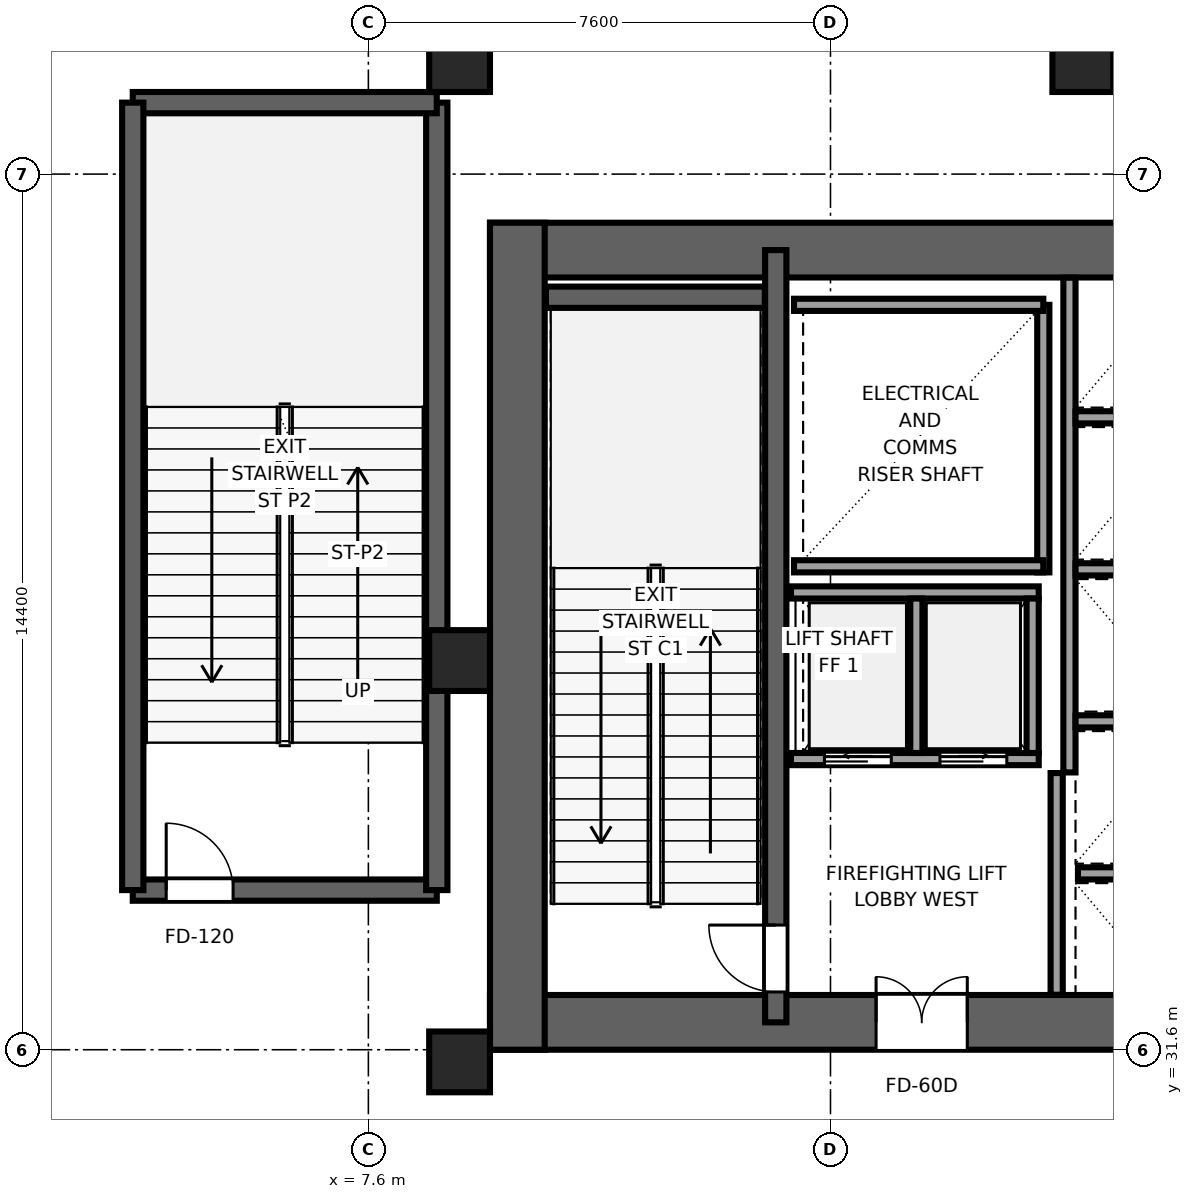
"""IFC4 building model, lengths in metres.
Left out: names, types, materials, properties, quantities, classifications, styles, units other than length and angle.
Written with IfcOpenShell. Run it as: python <this file> out.ifc"""

import sys

from ifc_helpers import new_model, si_unit, direction, frame, frame_2d, origin, origin_2d, place, context, subcontext, project, spatial, rectangle, extrude, source, transform, mapped, element, fill, save


model = new_model("IFC4")
c1 = context("Model", 3, precision=1e-05, world=origin(), true_north=direction((0.0, 1.0)))
c2 = subcontext(c1, "Body", "Model", "MODEL_VIEW")
j1 = project(units=[si_unit("LENGTHUNIT", "METRE"), si_unit("PLANEANGLEUNIT", "RADIAN")], contexts=[c1])
p1 = place(None, origin())
s1 = spatial("IfcSite", under=j1, at=p1, CompositionType="ELEMENT")
p2 = place(p1, origin())
s2 = spatial("IfcBuilding", under=s1, at=p2, CompositionType="ELEMENT")
p3 = place(p2, frame((0.0, 0.0, 16.0)))
s3 = spatial("IfcBuildingStorey", under=s2, at=p3, CompositionType="ELEMENT", Elevation=16.0)
p4 = place(p3, frame((9.6, 32.05, 0.0), z_axis=(0.0, 0.0, 1.0), x_axis=(1.0, 0.0, 0.0)))
e1 = element("IfcWall", 1, at=p4, inside=s3, PredefinedType="SHEAR", context=c2, shape_type="SweptSolid", body=[
    extrude(rectangle(XDim=26.8, YDim=0.9, at=frame_2d((13.4, 0.0))), origin(), (0.0, 0.0, 1.0), 6.4),
])
p5 = place(p4, frame((7.85, 0.0, 0.0), z_axis=(0.0, 0.0, 1.0), x_axis=(-1.0, 0.0, 0.0)))
e2 = element("IfcOpeningElement", 2, at=p5, cuts=e1, PredefinedType="OPENING", context=c2, shape_type="SweptSolid", body=[
    extrude(rectangle(XDim=1.5, YDim=2.04, at=frame_2d((0.75, 1.02))), frame((0.0, 0.46, 0.0), z_axis=(0.0, -1.0, 0.0), x_axis=(1.0, 0.0, 0.0)), (0.0, 0.0, 1.0), 0.92),
])
p6 = place(p4, frame((14.15, 0.0, 0.0), z_axis=(0.0, 0.0, 1.0), x_axis=(-1.0, 0.0, 0.0)))
e3 = element("IfcOpeningElement", 3, at=p6, cuts=e1, PredefinedType="OPENING", context=c2, shape_type="SweptSolid", body=[
    extrude(rectangle(XDim=1.5, YDim=2.04, at=frame_2d((0.75, 1.02))), frame((0.0, 0.46, 0.0), z_axis=(0.0, -1.0, 0.0), x_axis=(1.0, 0.0, 0.0)), (0.0, 0.0, 1.0), 0.92),
])
p7 = place(p4, frame((20.45, 0.0, 0.0), z_axis=(0.0, 0.0, 1.0), x_axis=(-1.0, 0.0, 0.0)))
e4 = element("IfcOpeningElement", 4, at=p7, cuts=e1, PredefinedType="OPENING", context=c2, shape_type="SweptSolid", body=[
    extrude(rectangle(XDim=1.5, YDim=2.04, at=frame_2d((0.75, 1.02))), frame((0.0, 0.46, 0.0), z_axis=(0.0, -1.0, 0.0), x_axis=(1.0, 0.0, 0.0)), (0.0, 0.0, 1.0), 0.92),
])
p8 = place(p3, frame((9.6, 44.75, 0.0), z_axis=(0.0, 0.0, 1.0), x_axis=(1.0, 0.0, 0.0)))
e5 = element("IfcWall", 5, at=p8, inside=s3, PredefinedType="SHEAR", context=c2, shape_type="SweptSolid", body=[
    extrude(rectangle(XDim=26.8, YDim=0.9, at=frame_2d((13.4, 0.0))), origin(), (0.0, 0.0, 1.0), 6.4),
])
p9 = place(p3, frame((10.05, 31.6, 0.0), z_axis=(0.0, 0.0, 1.0), x_axis=(0.0, 1.0, 0.0)))
e6 = element("IfcWall", 6, at=p9, inside=s3, PredefinedType="SHEAR", context=c2, shape_type="SweptSolid", body=[
    extrude(rectangle(XDim=13.6, YDim=0.9, at=frame_2d((6.8, 0.0))), origin(), (0.0, 0.0, 1.0), 6.4),
])
p10 = place(p3, frame((14.3, 32.05, 0.0), z_axis=(0.0, 0.0, 1.0), x_axis=(0.0, 1.0, 0.0)))
e7 = element("IfcWall", 7, at=p10, inside=s3, PredefinedType="SHEAR", context=c2, shape_type="SweptSolid", body=[
    extrude(rectangle(XDim=12.7, YDim=0.35, at=frame_2d((6.35, 0.0))), origin(), (0.0, 0.0, 1.0), 6.4),
])
p11 = place(p10, frame((0.5, 0.0, 0.0)))
e8 = element("IfcOpeningElement", 8, at=p11, cuts=e7, PredefinedType="OPENING", context=c2, shape_type="SweptSolid", body=[
    extrude(rectangle(XDim=1.1, YDim=2.12, at=frame_2d((0.55, 1.06))), frame((0.0, 0.185, 0.0), z_axis=(0.0, -1.0, 0.0), x_axis=(1.0, 0.0, 0.0)), (0.0, 0.0, 1.0), 0.37),
])
p12 = place(p3, frame((10.52, 43.975, 0.0), z_axis=(0.0, 0.0, 1.0), x_axis=(1.0, 0.0, 0.0)))
e9 = element("IfcWall", 9, at=p12, inside=s3, PredefinedType="SHEAR", context=c2, shape_type="SweptSolid", body=[
    extrude(rectangle(XDim=3.6, YDim=0.35, at=frame_2d((1.8, 0.0))), origin(), (0.0, 0.0, 1.0), 6.4),
])
p13 = place(p3, frame((3.725, 34.225, 0.0), z_axis=(0.0, 0.0, 1.0), x_axis=(1.0, 0.0, 0.0)))
e10 = element("IfcWall", 10, at=p13, inside=s3, PredefinedType="SHEAR", context=c2, shape_type="SweptSolid", body=[
    extrude(rectangle(XDim=5.0, YDim=0.35, at=frame_2d((2.5, 0.0))), origin(), (0.0, 0.0, 1.0), 6.4),
])
p14 = place(p13, frame((0.55, 0.0, 0.0)))
e11 = element("IfcOpeningElement", 11, at=p14, cuts=e10, PredefinedType="OPENING", context=c2, shape_type="SweptSolid", body=[
    extrude(rectangle(XDim=1.1, YDim=2.12, at=frame_2d((0.55, 1.06))), frame((0.0, 0.185, 0.0), z_axis=(0.0, -1.0, 0.0), x_axis=(1.0, 0.0, 0.0)), (0.0, 0.0, 1.0), 0.37),
])
p15 = place(p3, frame((8.725, 34.225, 0.0), z_axis=(0.0, 0.0, 1.0), x_axis=(0.0, 1.0, 0.0)))
e12 = element("IfcWall", 12, at=p15, inside=s3, PredefinedType="SHEAR", context=c2, shape_type="SweptSolid", body=[
    extrude(rectangle(XDim=12.95, YDim=0.35, at=frame_2d((6.475, 0.0))), origin(), (0.0, 0.0, 1.0), 6.4),
])
p16 = place(p3, frame((8.725, 47.175, 0.0), z_axis=(0.0, 0.0, 1.0), x_axis=(-1.0, 0.0, 0.0)))
e13 = element("IfcWall", 13, at=p16, inside=s3, PredefinedType="SHEAR", context=c2, shape_type="SweptSolid", body=[
    extrude(rectangle(XDim=5.0, YDim=0.35, at=frame_2d((2.5, 0.0))), origin(), (0.0, 0.0, 1.0), 6.4),
])
p17 = place(p3, frame((3.725, 47.175, 0.0), z_axis=(0.0, 0.0, 1.0), x_axis=(0.0, -1.0, 0.0)))
e14 = element("IfcWall", 14, at=p17, inside=s3, PredefinedType="SHEAR", context=c2, shape_type="SweptSolid", body=[
    extrude(rectangle(XDim=12.95, YDim=0.35, at=frame_2d((6.475, 0.0))), origin(), (0.0, 0.0, 1.0), 6.4),
])
m1 = source(origin(), c2, "Body", "SweptSolid", [
    extrude(rectangle(XDim=1.0, YDim=1.0, at=origin_2d()), origin(), (0.0, 0.0, 1.0), 6.4),
])
for number, where, z_axis, x_axis in (
    (15, (9.1, 47.85, 0.0), (0.0, 0.0, 1.0), (1.0, 0.0, 0.0)),
    (16, (19.35, 47.85, 0.0), (0.0, 0.0, 1.0), (1.0, 0.0, 0.0)),
    (17, (9.1, 38.0, 0.0), (0.0, 0.0, 1.0), (1.0, 0.0, 0.0)),
    (18, (9.1, 31.4, 0.0), (0.0, 0.0, 1.0), (1.0, 0.0, 0.0)),
):
    element("IfcColumn", number, at=place(p3, frame(where, z_axis=z_axis, x_axis=x_axis)), inside=s3, PredefinedType="COLUMN", context=c2, shape_type="MappedRepresentation", body=[
        mapped(m1, transform((0.0, 0.0, 0.0), x_axis=(1.0, 0.0, 0.0), y_axis=(0.0, 1.0, 0.0), z_axis=(0.0, 0.0, 1.0), scale=1.0)),
    ])
p18 = place(p3, frame((18.7, 39.45, 0.0), z_axis=(0.0, 0.0, 1.0), x_axis=(0.0, 1.0, 0.0)))
e19 = element("IfcWall", 19, at=p18, inside=s3, PredefinedType="SOLIDWALL", context=c2, shape_type="SweptSolid", body=[
    extrude(rectangle(XDim=4.4, YDim=0.2, at=frame_2d((2.2, 0.0))), origin(), (0.0, 0.0, 1.0), 6.14),
])
for number, where, z_axis, x_axis in (
    (20, (14.6, 39.55, 0.0), (0.0, 0.0, 1.0), (1.0, 0.0, 0.0)),
    (21, (14.6, 43.85, 0.0), (0.0, 0.0, 1.0), (1.0, 0.0, 0.0)),
):
    element("IfcWall", number, at=place(p3, frame(where, z_axis=z_axis, x_axis=x_axis)), inside=s3, PredefinedType="SOLIDWALL", context=c2, shape_type="SweptSolid", body=[
        extrude(rectangle(XDim=4.1, YDim=0.2, at=frame_2d((2.05, 0.0))), origin(), (0.0, 0.0, 1.0), 6.14),
    ])
p19 = place(p3, frame((18.92, 32.504, 0.0), z_axis=(0.0, 0.0, 1.0), x_axis=(0.0, 1.0, 0.0)))
e22 = element("IfcWall", 22, at=p19, inside=s3, PredefinedType="SOLIDWALL", context=c2, shape_type="SweptSolid", body=[
    extrude(rectangle(XDim=3.646, YDim=0.2, at=frame_2d((1.823, 0.0))), origin(), (0.0, 0.0, 1.0), 6.14),
])
p20 = place(p3, frame((19.13, 36.16, 0.0), z_axis=(0.0, 0.0, 1.0), x_axis=(0.0, 1.0, 0.0)))
e23 = element("IfcWall", 23, at=p20, inside=s3, PredefinedType="SOLIDWALL", context=c2, shape_type="SweptSolid", body=[
    extrude(rectangle(XDim=8.136, YDim=0.2, at=frame_2d((4.068, 0.0))), origin(), (0.0, 0.0, 1.0), 6.14),
])
p21 = place(p3, frame((19.27, 34.5, 0.0), z_axis=(0.0, 0.0, 1.0), x_axis=(1.0, 0.0, 0.0)))
e24 = element("IfcWall", 24, at=p21, inside=s3, PredefinedType="SOLIDWALL", context=c2, shape_type="SweptSolid", body=[
    extrude(rectangle(XDim=1.8, YDim=0.2, at=frame_2d((0.9, 0.0))), origin(), (0.0, 0.0, 1.0), 6.14),
])
for number, where, z_axis, x_axis in (
    (25, (19.23, 37.0, 0.0), (0.0, 0.0, 1.0), (1.0, 0.0, 0.0)),
    (26, (19.23, 39.5, 0.0), (0.0, 0.0, 1.0), (1.0, 0.0, 0.0)),
    (27, (19.23, 42.0, 0.0), (0.0, 0.0, 1.0), (1.0, 0.0, 0.0)),
):
    element("IfcWall", number, at=place(p3, frame(where, z_axis=z_axis, x_axis=x_axis)), inside=s3, PredefinedType="SOLIDWALL", context=c2, shape_type="SweptSolid", body=[
        extrude(rectangle(XDim=1.84, YDim=0.2, at=frame_2d((0.92, 0.0))), origin(), (0.0, 0.0, 1.0), 6.14),
    ])
p22 = place(p3, frame((14.55, 36.38, 0.0), z_axis=(0.0, 0.0, 1.0), x_axis=(1.0, 0.0, 0.0)))
e28 = element("IfcWall", 28, at=p22, inside=s3, PredefinedType="SOLIDWALL", context=c2, shape_type="SweptSolid", body=[
    extrude(rectangle(XDim=4.075, YDim=0.2, at=frame_2d((2.038, 0.0))), origin(), (0.0, 0.0, 1.0), 6.14),
])
p23 = place(p22, frame((0.55, 0.0, 0.0)))
e29 = element("IfcOpeningElement", 29, at=p23, cuts=e28, PredefinedType="OPENING", context=c2, shape_type="SweptSolid", body=[
    extrude(rectangle(XDim=1.1, YDim=2.12, at=frame_2d((0.55, 1.06))), frame((0.0, 0.11, 0.0), z_axis=(0.0, -1.0, 0.0), x_axis=(1.0, 0.0, 0.0)), (0.0, 0.0, 1.0), 0.22),
])
p24 = place(p22, frame((2.45, 0.0, 0.0)))
e30 = element("IfcOpeningElement", 30, at=p24, cuts=e28, PredefinedType="OPENING", context=c2, shape_type="SweptSolid", body=[
    extrude(rectangle(XDim=1.1, YDim=2.12, at=frame_2d((0.55, 1.06))), frame((0.0, 0.11, 0.0), z_axis=(0.0, -1.0, 0.0), x_axis=(1.0, 0.0, 0.0)), (0.0, 0.0, 1.0), 0.22),
])
p25 = place(p3, frame((14.55, 39.12, 0.0), z_axis=(0.0, 0.0, 1.0), x_axis=(1.0, 0.0, 0.0)))
e31 = element("IfcWall", 31, at=p25, inside=s3, PredefinedType="SOLIDWALL", context=c2, shape_type="SweptSolid", body=[
    extrude(rectangle(XDim=4.075, YDim=0.2, at=frame_2d((2.038, 0.0))), origin(), (0.0, 0.0, 1.0), 6.14),
])
for number, where, z_axis, x_axis in (
    (32, (18.525, 36.48, 0.0), (0.0, 0.0, 1.0), (0.0, 1.0, 0.0)),
    (33, (16.613, 36.48, 0.0), (0.0, 0.0, 1.0), (0.0, 1.0, 0.0)),
):
    element("IfcWall", number, at=place(p3, frame(where, z_axis=z_axis, x_axis=x_axis)), inside=s3, PredefinedType="SOLIDWALL", context=c2, shape_type="SweptSolid", body=[
        extrude(rectangle(XDim=2.54, YDim=0.2, at=frame_2d((1.27, 0.0))), origin(), (0.0, 0.0, 1.0), 6.14),
    ])
m2 = source(origin(), c2, "Body", "SweptSolid", [
    extrude(rectangle(XDim=1.1, YDim=2.12, at=frame_2d((0.55, 1.06))), frame((0.0, 0.025, 0.0), z_axis=(0.0, -1.0, 0.0), x_axis=(1.0, 0.0, 0.0)), (0.0, 0.0, 1.0), 0.05),
])
p26 = place(p11, origin())
e34 = element("IfcDoor", 34, at=p26, inside=s3, OperationType="SINGLE_SWING_RIGHT", PredefinedType="DOOR", context=c2, shape_type="MappedRepresentation", body=[
    mapped(m2, transform((0.0, 0.0, 0.0), x_axis=(1.0, 0.0, 0.0), y_axis=(0.0, 1.0, 0.0), z_axis=(0.0, 0.0, 1.0), scale=1.0)),
])
fill(e8, e34)
p27 = place(p14, origin())
e35 = element("IfcDoor", 35, at=p27, inside=s3, OperationType="SINGLE_SWING_LEFT", PredefinedType="DOOR", context=c2, shape_type="MappedRepresentation", body=[
    mapped(m2, transform((0.0, 0.0, 0.0), x_axis=(1.0, 0.0, 0.0), y_axis=(0.0, 1.0, 0.0), z_axis=(0.0, 0.0, 1.0), scale=1.0)),
])
fill(e11, e35)
m3 = source(origin(), c2, "Body", "SweptSolid", [
    extrude(rectangle(XDim=1.5, YDim=2.04, at=frame_2d((0.75, 1.02))), frame((0.0, 0.025, 0.0), z_axis=(0.0, -1.0, 0.0), x_axis=(1.0, 0.0, 0.0)), (0.0, 0.0, 1.0), 0.05),
])
p28 = place(p5, origin())
e36 = element("IfcDoor", 36, at=p28, inside=s3, OperationType="DOUBLE_DOOR_SINGLE_SWING", PredefinedType="DOOR", context=c2, shape_type="MappedRepresentation", body=[
    mapped(m3, transform((0.0, 0.0, 0.0), x_axis=(1.0, 0.0, 0.0), y_axis=(0.0, 1.0, 0.0), z_axis=(0.0, 0.0, 1.0), scale=1.0)),
])
fill(e2, e36)
m4 = source(origin(), c2, "Body", "SweptSolid", [
    extrude(rectangle(XDim=1.1, YDim=2.12, at=frame_2d((0.55, 1.06))), frame((0.0, 0.025, 0.0), z_axis=(0.0, -1.0, 0.0), x_axis=(1.0, 0.0, 0.0)), (0.0, 0.0, 1.0), 0.05),
])
p29 = place(p23, origin())
e37 = element("IfcDoor", 37, at=p29, inside=s3, OperationType="SLIDING_TO_LEFT", PredefinedType="DOOR", context=c2, shape_type="MappedRepresentation", body=[
    mapped(m4, transform((0.0, 0.0, 0.0), x_axis=(1.0, 0.0, 0.0), y_axis=(0.0, 1.0, 0.0), z_axis=(0.0, 0.0, 1.0), scale=1.0)),
])
fill(e29, e37)
p30 = place(p24, origin())
e38 = element("IfcDoor", 38, at=p30, inside=s3, OperationType="SLIDING_TO_RIGHT", PredefinedType="DOOR", context=c2, shape_type="MappedRepresentation", body=[
    mapped(m4, transform((0.0, 0.0, 0.0), x_axis=(1.0, 0.0, 0.0), y_axis=(0.0, 1.0, 0.0), z_axis=(0.0, 0.0, 1.0), scale=1.0)),
])
fill(e30, e38)
save(model, sys.argv[1])
